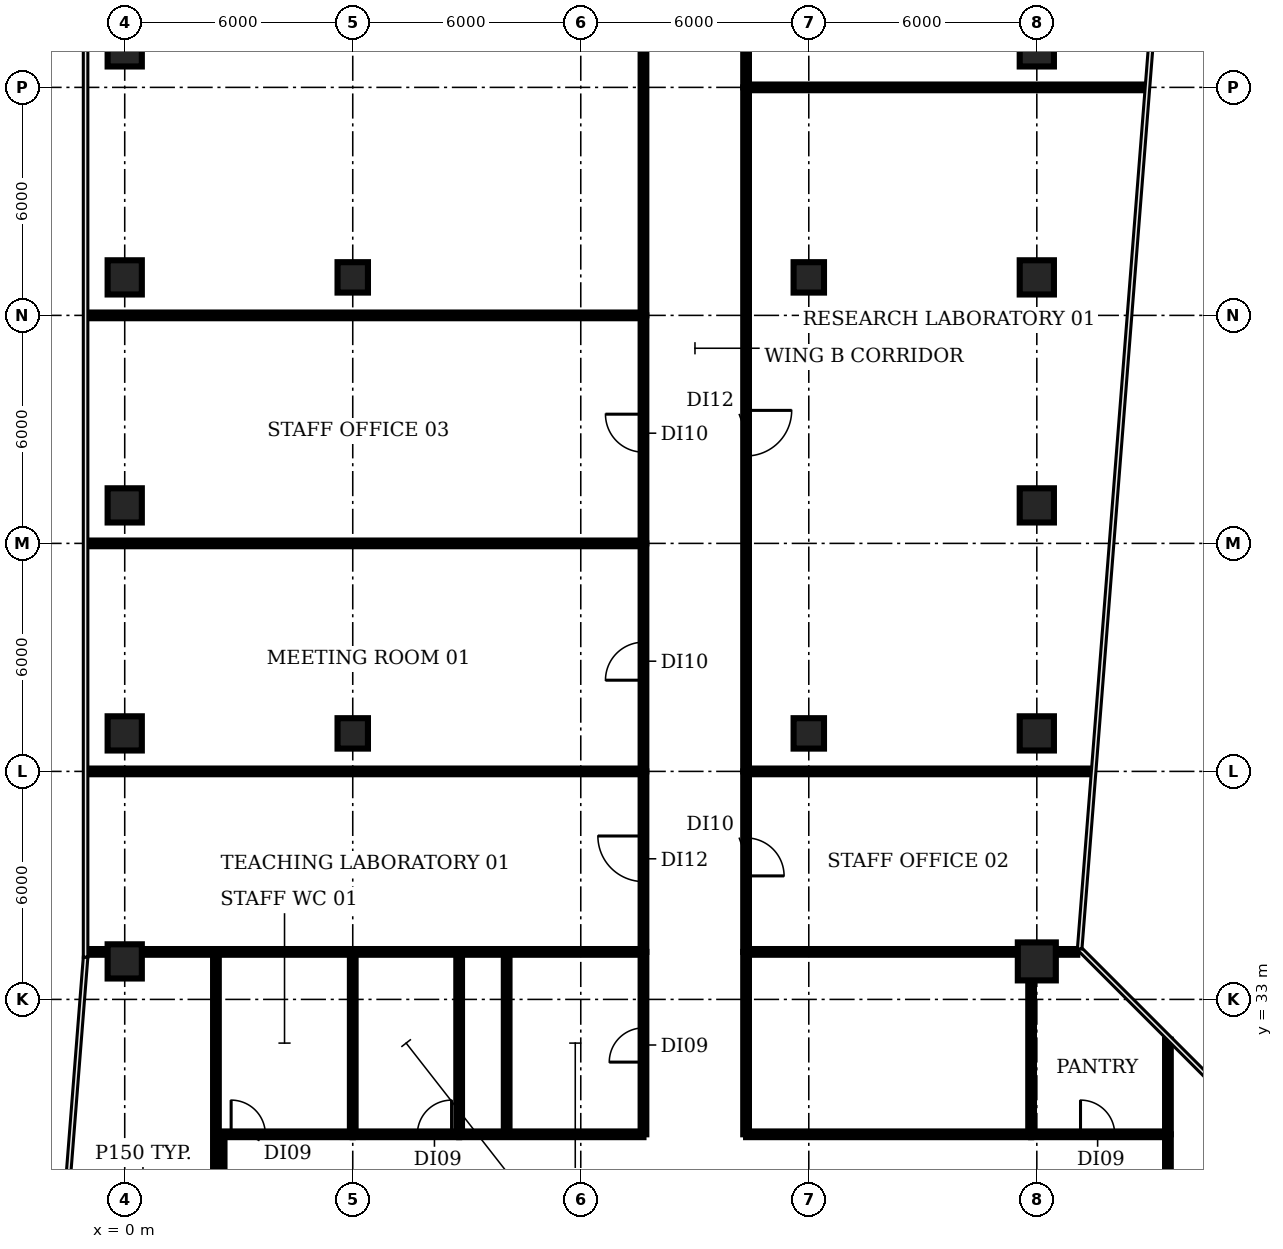
"""IFC4 building model, lengths in metres.
Left out: names, types, materials, properties, quantities, classifications, styles, units other than length and angle.
Written with IfcOpenShell. Run it as: python <this file> out.ifc"""

import sys

from ifc_helpers import new_model, si_unit, direction, frame, frame_2d, origin, origin_2d, place, context, subcontext, project, spatial, rectangle, circle, extrude, element, fill, save


model = new_model("IFC4")
c1 = context("Model", 3, precision=1e-05, world=origin(), true_north=direction((0.0, 1.0)))
c2 = subcontext(c1, "Body", "Model", "MODEL_VIEW")
j1 = project(units=[si_unit("LENGTHUNIT", "METRE"), si_unit("PLANEANGLEUNIT", "RADIAN")], contexts=[c1])
p1 = place(None, origin())
s1 = spatial("IfcSite", under=j1, at=p1, CompositionType="ELEMENT")
p2 = place(p1, origin())
s2 = spatial("IfcBuilding", under=s1, at=p2, CompositionType="ELEMENT")
p3 = place(p2, frame((0.0, 0.0, 129.8)))
s3 = spatial("IfcBuildingStorey", under=s2, at=p3, CompositionType="ELEMENT", Elevation=129.8)
for number, where, z_axis, x_axis in (
    (1, (0.0, 34.0, 0.0), (0.0, 0.0, 1.0), (1.0, 0.0, 0.0)),
    (2, (0.0, 40.0, 0.0), (0.0, 0.0, 1.0), (1.0, 0.0, 0.0)),
    (3, (0.0, 46.0, 0.0), (0.0, 0.0, 1.0), (1.0, 0.0, 0.0)),
    (4, (0.0, 52.0, 0.0), (0.0, 0.0, 1.0), (1.0, 0.0, 0.0)),
    (5, (0.0, 58.0, 0.0), (0.0, 0.0, 1.0), (1.0, 0.0, 0.0)),
):
    element("IfcColumn", number, at=place(p3, frame(where, z_axis=z_axis, x_axis=x_axis)), inside=s3, PredefinedType="COLUMN", context=c2, shape_type="SweptSolid", body=[
        extrude(rectangle(XDim=0.9, YDim=0.9, at=origin_2d()), origin(), (0.0, 0.0, 1.0), 3.85),
    ])
for number, where, z_axis, x_axis in (
    (6, (6.0, 40.0, 0.0), (0.0, 0.0, 1.0), (1.0, 0.0, 0.0)),
    (7, (6.0, 52.0, 0.0), (0.0, 0.0, 1.0), (1.0, 0.0, 0.0)),
    (8, (18.0, 40.0, 0.0), (0.0, 0.0, 1.0), (1.0, 0.0, 0.0)),
    (9, (18.0, 52.0, 0.0), (0.0, 0.0, 1.0), (1.0, 0.0, 0.0)),
):
    element("IfcColumn", number, at=place(p3, frame(where, z_axis=z_axis, x_axis=x_axis)), inside=s3, PredefinedType="COLUMN", context=c2, shape_type="SweptSolid", body=[
        extrude(rectangle(XDim=0.8, YDim=0.8, at=origin_2d()), origin(), (0.0, 0.0, 1.0), 3.85),
    ])
p4 = place(p3, frame((24.0, 34.0, 0.0), z_axis=(0.0, 0.0, 1.0), x_axis=(1.0, 0.0, 0.0)))
e10 = element("IfcColumn", 10, at=p4, inside=s3, PredefinedType="COLUMN", context=c2, shape_type="SweptSolid", body=[
    extrude(circle(Radius=0.5, at=origin_2d()), origin(), (0.0, 0.0, 1.0), 3.85),
])
for number, where, z_axis, x_axis in (
    (11, (24.0, 40.0, 0.0), (0.0, 0.0, 1.0), (1.0, 0.0, 0.0)),
    (12, (24.0, 46.0, 0.0), (0.0, 0.0, 1.0), (1.0, 0.0, 0.0)),
    (13, (24.0, 52.0, 0.0), (0.0, 0.0, 1.0), (1.0, 0.0, 0.0)),
    (14, (24.0, 58.0, 0.0), (0.0, 0.0, 1.0), (1.0, 0.0, 0.0)),
):
    element("IfcColumn", number, at=place(p3, frame(where, z_axis=z_axis, x_axis=x_axis)), inside=s3, PredefinedType="COLUMN", context=c2, shape_type="SweptSolid", body=[
        extrude(rectangle(XDim=0.9, YDim=0.9, at=origin_2d()), origin(), (0.0, 0.0, 1.0), 3.85),
    ])
p5 = place(p3, frame((-0.965, 34.25, 0.0), z_axis=(0.0, 0.0, 1.0), x_axis=(1.0, 0.0, 0.0)))
e15 = element("IfcWall", 15, at=p5, inside=s3, PredefinedType="PARTITIONING", context=c2, shape_type="SweptSolid", body=[
    extrude(rectangle(XDim=14.615, YDim=0.15, at=frame_2d((7.308, 0.0))), origin(), (0.0, 0.0, 1.0), 2.83),
])
for number, where, z_axis, x_axis in (
    (16, (-0.98, 39.0, 0.0), (0.0, 0.0, 1.0), (1.0, 0.0, 0.0)),
    (17, (-0.98, 45.0, 0.0), (0.0, 0.0, 1.0), (1.0, 0.0, 0.0)),
    (18, (-0.98, 51.0, 0.0), (0.0, 0.0, 1.0), (1.0, 0.0, 0.0)),
):
    element("IfcWall", number, at=place(p3, frame(where, z_axis=z_axis, x_axis=x_axis)), inside=s3, PredefinedType="PARTITIONING", context=c2, shape_type="SweptSolid", body=[
        extrude(rectangle(XDim=14.63, YDim=0.15, at=frame_2d((7.315, 0.0))), origin(), (0.0, 0.0, 1.0), 2.83),
    ])
p6 = place(p3, frame((2.4, 28.25, 0.0), z_axis=(0.0, 0.0, 1.0), x_axis=(0.0, 1.0, 0.0)))
e19 = element("IfcWall", 19, at=p6, inside=s3, PredefinedType="PARTITIONING", context=c2, shape_type="SweptSolid", body=[
    extrude(rectangle(XDim=6.0, YDim=0.15, at=frame_2d((3.0, 0.0))), origin(), (0.0, 0.0, 1.0), 2.83),
])
p7 = place(p3, frame((2.55, 25.55, 0.0), z_axis=(0.0, 0.0, 1.0), x_axis=(0.0, 1.0, 0.0)))
e20 = element("IfcWall", 20, at=p7, inside=s3, PredefinedType="PARTITIONING", context=c2, shape_type="SweptSolid", body=[
    extrude(rectangle(XDim=3.9, YDim=0.15, at=frame_2d((1.95, 0.0))), origin(), (0.0, 0.0, 1.0), 2.83),
])
p8 = place(p3, frame((2.55, 29.45, 0.0), z_axis=(0.0, 0.0, 1.0), x_axis=(1.0, 0.0, 0.0)))
e21 = element("IfcWall", 21, at=p8, inside=s3, PredefinedType="PARTITIONING", context=c2, shape_type="SweptSolid", body=[
    extrude(rectangle(XDim=3.45, YDim=0.15, at=frame_2d((1.725, 0.0))), origin(), (0.0, 0.0, 1.0), 2.83),
])
p9 = place(p8, frame((0.25, 0.0, 0.0)))
e22 = element("IfcOpeningElement", 22, at=p9, cuts=e21, PredefinedType="OPENING", context=c2, shape_type="SweptSolid", body=[
    extrude(rectangle(XDim=0.9, YDim=2.1, at=frame_2d((0.45, 1.05))), frame((0.0, 0.085, 0.0), z_axis=(0.0, -1.0, 0.0), x_axis=(1.0, 0.0, 0.0)), (0.0, 0.0, 1.0), 0.17),
])
p10 = place(p3, frame((6.0, 29.45, 0.0), z_axis=(0.0, 0.0, 1.0), x_axis=(0.0, 1.0, 0.0)))
e23 = element("IfcWall", 23, at=p10, inside=s3, PredefinedType="PARTITIONING", context=c2, shape_type="SweptSolid", body=[
    extrude(rectangle(XDim=4.8, YDim=0.15, at=frame_2d((2.4, 0.0))), origin(), (0.0, 0.0, 1.0), 2.83),
])
p11 = place(p3, frame((6.0, 29.45, 0.0), z_axis=(0.0, 0.0, 1.0), x_axis=(1.0, 0.0, 0.0)))
e24 = element("IfcWall", 24, at=p11, inside=s3, PredefinedType="PARTITIONING", context=c2, shape_type="SweptSolid", body=[
    extrude(rectangle(XDim=2.8, YDim=0.15, at=frame_2d((1.4, 0.0))), origin(), (0.0, 0.0, 1.0), 2.83),
])
p12 = place(p11, frame((1.7, 0.0, 0.0)))
e25 = element("IfcOpeningElement", 25, at=p12, cuts=e24, PredefinedType="OPENING", context=c2, shape_type="SweptSolid", body=[
    extrude(rectangle(XDim=0.9, YDim=2.1, at=frame_2d((0.45, 1.05))), frame((0.0, 0.085, 0.0), z_axis=(0.0, -1.0, 0.0), x_axis=(1.0, 0.0, 0.0)), (0.0, 0.0, 1.0), 0.17),
])
p13 = place(p3, frame((8.8, 29.45, 0.0), z_axis=(0.0, 0.0, 1.0), x_axis=(0.0, 1.0, 0.0)))
e26 = element("IfcWall", 26, at=p13, inside=s3, PredefinedType="PARTITIONING", context=c2, shape_type="SweptSolid", body=[
    extrude(rectangle(XDim=4.8, YDim=0.15, at=frame_2d((2.4, 0.0))), origin(), (0.0, 0.0, 1.0), 2.83),
])
p14 = place(p3, frame((8.8, 29.45, 0.0), z_axis=(0.0, 0.0, 1.0), x_axis=(1.0, 0.0, 0.0)))
e27 = element("IfcWall", 27, at=p14, inside=s3, PredefinedType="PARTITIONING", context=c2, shape_type="SweptSolid", body=[
    extrude(rectangle(XDim=4.85, YDim=0.15, at=frame_2d((2.425, 0.0))), origin(), (0.0, 0.0, 1.0), 2.83),
])
p15 = place(p3, frame((10.05, 29.45, 0.0), z_axis=(0.0, 0.0, 1.0), x_axis=(0.0, 1.0, 0.0)))
e28 = element("IfcWall", 28, at=p15, inside=s3, PredefinedType="PARTITIONING", context=c2, shape_type="SweptSolid", body=[
    extrude(rectangle(XDim=4.8, YDim=0.15, at=frame_2d((2.4, 0.0))), origin(), (0.0, 0.0, 1.0), 2.83),
])
p16 = place(p3, frame((13.65, 29.45, 0.0), z_axis=(0.0, 0.0, 1.0), x_axis=(0.0, 1.0, 0.0)))
e29 = element("IfcWall", 29, at=p16, inside=s3, PredefinedType="PARTITIONING", context=c2, shape_type="SweptSolid", body=[
    extrude(rectangle(XDim=4.8, YDim=0.15, at=frame_2d((2.4, 0.0))), origin(), (0.0, 0.0, 1.0), 2.83),
])
p17 = place(p16, frame((1.9, 0.0, 0.0)))
e30 = element("IfcOpeningElement", 30, at=p17, cuts=e29, PredefinedType="OPENING", context=c2, shape_type="SweptSolid", body=[
    extrude(rectangle(XDim=0.9, YDim=2.1, at=frame_2d((0.45, 1.05))), frame((0.0, 0.085, 0.0), z_axis=(0.0, -1.0, 0.0), x_axis=(1.0, 0.0, 0.0)), (0.0, 0.0, 1.0), 0.17),
])
p18 = place(p3, frame((13.65, 34.25, 0.0), z_axis=(0.0, 0.0, 1.0), x_axis=(0.0, 1.0, 0.0)))
e31 = element("IfcWall", 31, at=p18, inside=s3, PredefinedType="PARTITIONING", context=c2, shape_type="SweptSolid", body=[
    extrude(rectangle(XDim=4.75, YDim=0.15, at=frame_2d((2.375, 0.0))), origin(), (0.0, 0.0, 1.0), 2.83),
])
p19 = place(p18, frame((1.85, 0.0, 0.0)))
e32 = element("IfcOpeningElement", 32, at=p19, cuts=e31, PredefinedType="OPENING", context=c2, shape_type="SweptSolid", body=[
    extrude(rectangle(XDim=1.2, YDim=2.1, at=frame_2d((0.6, 1.05))), frame((0.0, 0.085, 0.0), z_axis=(0.0, -1.0, 0.0), x_axis=(1.0, 0.0, 0.0)), (0.0, 0.0, 1.0), 0.17),
])
p20 = place(p3, frame((13.65, 39.0, 0.0), z_axis=(0.0, 0.0, 1.0), x_axis=(0.0, 1.0, 0.0)))
e33 = element("IfcWall", 33, at=p20, inside=s3, PredefinedType="PARTITIONING", context=c2, shape_type="SweptSolid", body=[
    extrude(rectangle(XDim=6.0, YDim=0.15, at=frame_2d((3.0, 0.0))), origin(), (0.0, 0.0, 1.0), 2.83),
])
p21 = place(p20, frame((2.4, 0.0, 0.0)))
e34 = element("IfcOpeningElement", 34, at=p21, cuts=e33, PredefinedType="OPENING", context=c2, shape_type="SweptSolid", body=[
    extrude(rectangle(XDim=1.0, YDim=2.1, at=frame_2d((0.5, 1.05))), frame((0.0, 0.085, 0.0), z_axis=(0.0, -1.0, 0.0), x_axis=(1.0, 0.0, 0.0)), (0.0, 0.0, 1.0), 0.17),
])
p22 = place(p3, frame((13.65, 45.0, 0.0), z_axis=(0.0, 0.0, 1.0), x_axis=(0.0, 1.0, 0.0)))
e35 = element("IfcWall", 35, at=p22, inside=s3, PredefinedType="PARTITIONING", context=c2, shape_type="SweptSolid", body=[
    extrude(rectangle(XDim=6.0, YDim=0.15, at=frame_2d((3.0, 0.0))), origin(), (0.0, 0.0, 1.0), 2.83),
])
p23 = place(p22, frame((2.4, 0.0, 0.0)))
e36 = element("IfcOpeningElement", 36, at=p23, cuts=e35, PredefinedType="OPENING", context=c2, shape_type="SweptSolid", body=[
    extrude(rectangle(XDim=1.0, YDim=2.1, at=frame_2d((0.5, 1.05))), frame((0.0, 0.085, 0.0), z_axis=(0.0, -1.0, 0.0), x_axis=(1.0, 0.0, 0.0)), (0.0, 0.0, 1.0), 0.17),
])
p24 = place(p3, frame((13.65, 51.0, 0.0), z_axis=(0.0, 0.0, 1.0), x_axis=(0.0, 1.0, 0.0)))
e37 = element("IfcWall", 37, at=p24, inside=s3, PredefinedType="PARTITIONING", context=c2, shape_type="SweptSolid", body=[
    extrude(rectangle(XDim=19.84, YDim=0.15, at=frame_2d((9.92, 0.0))), origin(), (0.0, 0.0, 1.0), 2.83),
])
p25 = place(p24, frame((9.44, 0.0, 0.0)))
e38 = element("IfcOpeningElement", 38, at=p25, cuts=e37, PredefinedType="OPENING", context=c2, shape_type="SweptSolid", body=[
    extrude(rectangle(XDim=1.2, YDim=2.1, at=frame_2d((0.6, 1.05))), frame((0.0, 0.085, 0.0), z_axis=(0.0, -1.0, 0.0), x_axis=(1.0, 0.0, 0.0)), (0.0, 0.0, 1.0), 0.17),
])
p26 = place(p3, frame((16.35, 29.45, 0.0), z_axis=(0.0, 0.0, 1.0), x_axis=(0.0, 1.0, 0.0)))
e39 = element("IfcWall", 39, at=p26, inside=s3, PredefinedType="PARTITIONING", context=c2, shape_type="SweptSolid", body=[
    extrude(rectangle(XDim=4.8, YDim=0.15, at=frame_2d((2.4, 0.0))), origin(), (0.0, 0.0, 1.0), 2.83),
])
p27 = place(p3, frame((16.35, 29.45, 0.0), z_axis=(0.0, 0.0, 1.0), x_axis=(1.0, 0.0, 0.0)))
e40 = element("IfcWall", 40, at=p27, inside=s3, PredefinedType="PARTITIONING", context=c2, shape_type="SweptSolid", body=[
    extrude(rectangle(XDim=7.5, YDim=0.15, at=frame_2d((3.75, 0.0))), origin(), (0.0, 0.0, 1.0), 2.83),
])
p28 = place(p3, frame((16.35, 34.25, 0.0), z_axis=(0.0, 0.0, 1.0), x_axis=(1.0, 0.0, 0.0)))
e41 = element("IfcWall", 41, at=p28, inside=s3, PredefinedType="PARTITIONING", context=c2, shape_type="SweptSolid", body=[
    extrude(rectangle(XDim=8.715, YDim=0.15, at=frame_2d((4.357, 0.0))), origin(), (0.0, 0.0, 1.0), 2.83),
])
p29 = place(p3, frame((16.35, 39.0, 0.0), z_axis=(0.0, 0.0, 1.0), x_axis=(0.0, -1.0, 0.0)))
e42 = element("IfcWall", 42, at=p29, inside=s3, PredefinedType="PARTITIONING", context=c2, shape_type="SweptSolid", body=[
    extrude(rectangle(XDim=4.75, YDim=0.15, at=frame_2d((2.375, 0.0))), origin(), (0.0, 0.0, 1.0), 2.83),
])
p30 = place(p29, frame((1.75, 0.0, 0.0)))
e43 = element("IfcOpeningElement", 43, at=p30, cuts=e42, PredefinedType="OPENING", context=c2, shape_type="SweptSolid", body=[
    extrude(rectangle(XDim=1.0, YDim=2.1, at=frame_2d((0.5, 1.05))), frame((0.0, 0.085, 0.0), z_axis=(0.0, -1.0, 0.0), x_axis=(1.0, 0.0, 0.0)), (0.0, 0.0, 1.0), 0.17),
])
p31 = place(p3, frame((16.35, 39.0, 0.0), z_axis=(0.0, 0.0, 1.0), x_axis=(1.0, 0.0, 0.0)))
e44 = element("IfcWall", 44, at=p31, inside=s3, PredefinedType="PARTITIONING", context=c2, shape_type="SweptSolid", body=[
    extrude(rectangle(XDim=9.1, YDim=0.15, at=frame_2d((4.55, 0.0))), origin(), (0.0, 0.0, 1.0), 2.83),
])
p32 = place(p3, frame((16.35, 57.0, 0.0), z_axis=(0.0, 0.0, 1.0), x_axis=(0.0, -1.0, 0.0)))
e45 = element("IfcWall", 45, at=p32, inside=s3, PredefinedType="PARTITIONING", context=c2, shape_type="SweptSolid", body=[
    extrude(rectangle(XDim=18.0, YDim=0.15, at=frame_2d((9.0, 0.0))), origin(), (0.0, 0.0, 1.0), 2.83),
])
p33 = place(p32, frame((8.5, 0.0, 0.0)))
e46 = element("IfcOpeningElement", 46, at=p33, cuts=e45, PredefinedType="OPENING", context=c2, shape_type="SweptSolid", body=[
    extrude(rectangle(XDim=1.2, YDim=2.1, at=frame_2d((0.6, 1.05))), frame((0.0, 0.085, 0.0), z_axis=(0.0, -1.0, 0.0), x_axis=(1.0, 0.0, 0.0)), (0.0, 0.0, 1.0), 0.17),
])
p34 = place(p3, frame((16.35, 57.0, 0.0), z_axis=(0.0, 0.0, 1.0), x_axis=(1.0, 0.0, 0.0)))
e47 = element("IfcWall", 47, at=p34, inside=s3, PredefinedType="PARTITIONING", context=c2, shape_type="SweptSolid", body=[
    extrude(rectangle(XDim=10.51, YDim=0.15, at=frame_2d((5.255, 0.0))), origin(), (0.0, 0.0, 1.0), 2.83),
])
p35 = place(p3, frame((16.35, 70.81, 0.0), z_axis=(0.0, 0.0, 1.0), x_axis=(0.0, -1.0, 0.0)))
e48 = element("IfcWall", 48, at=p35, inside=s3, PredefinedType="PARTITIONING", context=c2, shape_type="SweptSolid", body=[
    extrude(rectangle(XDim=13.81, YDim=0.15, at=frame_2d((6.905, 0.0))), origin(), (0.0, 0.0, 1.0), 2.83),
])
p36 = place(p35, frame((8.81, 0.0, 0.0)))
e49 = element("IfcOpeningElement", 49, at=p36, cuts=e48, PredefinedType="OPENING", context=c2, shape_type="SweptSolid", body=[
    extrude(rectangle(XDim=1.2, YDim=2.1, at=frame_2d((0.6, 1.05))), frame((0.0, 0.085, 0.0), z_axis=(0.0, -1.0, 0.0), x_axis=(1.0, 0.0, 0.0)), (0.0, 0.0, 1.0), 0.17),
])
p37 = place(p3, frame((23.85, 29.45, 0.0), z_axis=(0.0, 0.0, 1.0), x_axis=(0.0, 1.0, 0.0)))
e50 = element("IfcWall", 50, at=p37, inside=s3, PredefinedType="PARTITIONING", context=c2, shape_type="SweptSolid", body=[
    extrude(rectangle(XDim=4.8, YDim=0.15, at=frame_2d((2.4, 0.0))), origin(), (0.0, 0.0, 1.0), 2.83),
])
p38 = place(p3, frame((23.85, 29.45, 0.0), z_axis=(0.0, 0.0, 1.0), x_axis=(1.0, 0.0, 0.0)))
e51 = element("IfcWall", 51, at=p38, inside=s3, PredefinedType="PARTITIONING", context=c2, shape_type="SweptSolid", body=[
    extrude(rectangle(XDim=3.6, YDim=0.15, at=frame_2d((1.8, 0.0))), origin(), (0.0, 0.0, 1.0), 2.83),
])
p39 = place(p38, frame((1.3, 0.0, 0.0)))
e52 = element("IfcOpeningElement", 52, at=p39, cuts=e51, PredefinedType="OPENING", context=c2, shape_type="SweptSolid", body=[
    extrude(rectangle(XDim=0.9, YDim=2.1, at=frame_2d((0.45, 1.05))), frame((0.0, 0.085, 0.0), z_axis=(0.0, -1.0, 0.0), x_axis=(1.0, 0.0, 0.0)), (0.0, 0.0, 1.0), 0.17),
])
p40 = place(p3, frame((27.45, 25.6, 0.0), z_axis=(0.0, 0.0, 1.0), x_axis=(0.0, 1.0, 0.0)))
e53 = element("IfcWall", 53, at=p40, inside=s3, PredefinedType="PARTITIONING", context=c2, shape_type="SweptSolid", body=[
    extrude(rectangle(XDim=3.85, YDim=0.15, at=frame_2d((1.925, 0.0))), origin(), (0.0, 0.0, 1.0), 2.83),
])
p41 = place(p3, frame((27.45, 29.45, 0.0), z_axis=(0.0, 0.0, 1.0), x_axis=(0.0, 1.0, 0.0)))
e54 = element("IfcWall", 54, at=p41, inside=s3, PredefinedType="PARTITIONING", context=c2, shape_type="SweptSolid", body=[
    extrude(rectangle(XDim=2.49, YDim=0.15, at=frame_2d((1.245, 0.0))), origin(), (0.0, 0.0, 1.0), 2.83),
])
p42 = place(p9, origin())
e55 = element("IfcDoor", 55, at=p42, inside=s3, OperationType="SINGLE_SWING_LEFT", PredefinedType="DOOR", context=c2, shape_type="SweptSolid", body=[
    extrude(rectangle(XDim=0.9, YDim=2.1, at=frame_2d((0.45, 1.05))), frame((0.0, 0.025, 0.0), z_axis=(0.0, -1.0, 0.0), x_axis=(1.0, 0.0, 0.0)), (0.0, 0.0, 1.0), 0.05),
])
fill(e22, e55)
p43 = place(p12, origin())
e56 = element("IfcDoor", 56, at=p43, inside=s3, OperationType="SINGLE_SWING_RIGHT", PredefinedType="DOOR", context=c2, shape_type="SweptSolid", body=[
    extrude(rectangle(XDim=0.9, YDim=2.1, at=frame_2d((0.45, 1.05))), frame((0.0, 0.025, 0.0), z_axis=(0.0, -1.0, 0.0), x_axis=(1.0, 0.0, 0.0)), (0.0, 0.0, 1.0), 0.05),
])
fill(e25, e56)
p44 = place(p17, origin())
e57 = element("IfcDoor", 57, at=p44, inside=s3, OperationType="SINGLE_SWING_LEFT", PredefinedType="DOOR", context=c2, shape_type="SweptSolid", body=[
    extrude(rectangle(XDim=0.9, YDim=2.1, at=frame_2d((0.45, 1.05))), frame((0.0, 0.025, 0.0), z_axis=(0.0, -1.0, 0.0), x_axis=(1.0, 0.0, 0.0)), (0.0, 0.0, 1.0), 0.05),
])
fill(e30, e57)
p45 = place(p19, origin())
e58 = element("IfcDoor", 58, at=p45, inside=s3, OperationType="SINGLE_SWING_RIGHT", PredefinedType="DOOR", context=c2, shape_type="SweptSolid", body=[
    extrude(rectangle(XDim=1.2, YDim=2.1, at=frame_2d((0.6, 1.05))), frame((0.0, 0.025, 0.0), z_axis=(0.0, -1.0, 0.0), x_axis=(1.0, 0.0, 0.0)), (0.0, 0.0, 1.0), 0.05),
])
fill(e32, e58)
p46 = place(p21, origin())
e59 = element("IfcDoor", 59, at=p46, inside=s3, OperationType="SINGLE_SWING_LEFT", PredefinedType="DOOR", context=c2, shape_type="SweptSolid", body=[
    extrude(rectangle(XDim=1.0, YDim=2.1, at=frame_2d((0.5, 1.05))), frame((0.0, 0.025, 0.0), z_axis=(0.0, -1.0, 0.0), x_axis=(1.0, 0.0, 0.0)), (0.0, 0.0, 1.0), 0.05),
])
fill(e34, e59)
p47 = place(p23, origin())
e60 = element("IfcDoor", 60, at=p47, inside=s3, OperationType="SINGLE_SWING_RIGHT", PredefinedType="DOOR", context=c2, shape_type="SweptSolid", body=[
    extrude(rectangle(XDim=1.0, YDim=2.1, at=frame_2d((0.5, 1.05))), frame((0.0, 0.025, 0.0), z_axis=(0.0, -1.0, 0.0), x_axis=(1.0, 0.0, 0.0)), (0.0, 0.0, 1.0), 0.05),
])
fill(e36, e60)
p48 = place(p30, origin())
e61 = element("IfcDoor", 61, at=p48, inside=s3, OperationType="SINGLE_SWING_RIGHT", PredefinedType="DOOR", context=c2, shape_type="SweptSolid", body=[
    extrude(rectangle(XDim=1.0, YDim=2.1, at=frame_2d((0.5, 1.05))), frame((0.0, 0.025, 0.0), z_axis=(0.0, -1.0, 0.0), x_axis=(1.0, 0.0, 0.0)), (0.0, 0.0, 1.0), 0.05),
])
fill(e43, e61)
p49 = place(p33, origin())
e62 = element("IfcDoor", 62, at=p49, inside=s3, OperationType="SINGLE_SWING_LEFT", PredefinedType="DOOR", context=c2, shape_type="SweptSolid", body=[
    extrude(rectangle(XDim=1.2, YDim=2.1, at=frame_2d((0.6, 1.05))), frame((0.0, 0.025, 0.0), z_axis=(0.0, -1.0, 0.0), x_axis=(1.0, 0.0, 0.0)), (0.0, 0.0, 1.0), 0.05),
])
fill(e46, e62)
p50 = place(p39, origin())
e63 = element("IfcDoor", 63, at=p50, inside=s3, OperationType="SINGLE_SWING_LEFT", PredefinedType="DOOR", context=c2, shape_type="SweptSolid", body=[
    extrude(rectangle(XDim=0.9, YDim=2.1, at=frame_2d((0.45, 1.05))), frame((0.0, 0.025, 0.0), z_axis=(0.0, -1.0, 0.0), x_axis=(1.0, 0.0, 0.0)), (0.0, 0.0, 1.0), 0.05),
])
fill(e52, e63)
save(model, sys.argv[1])
